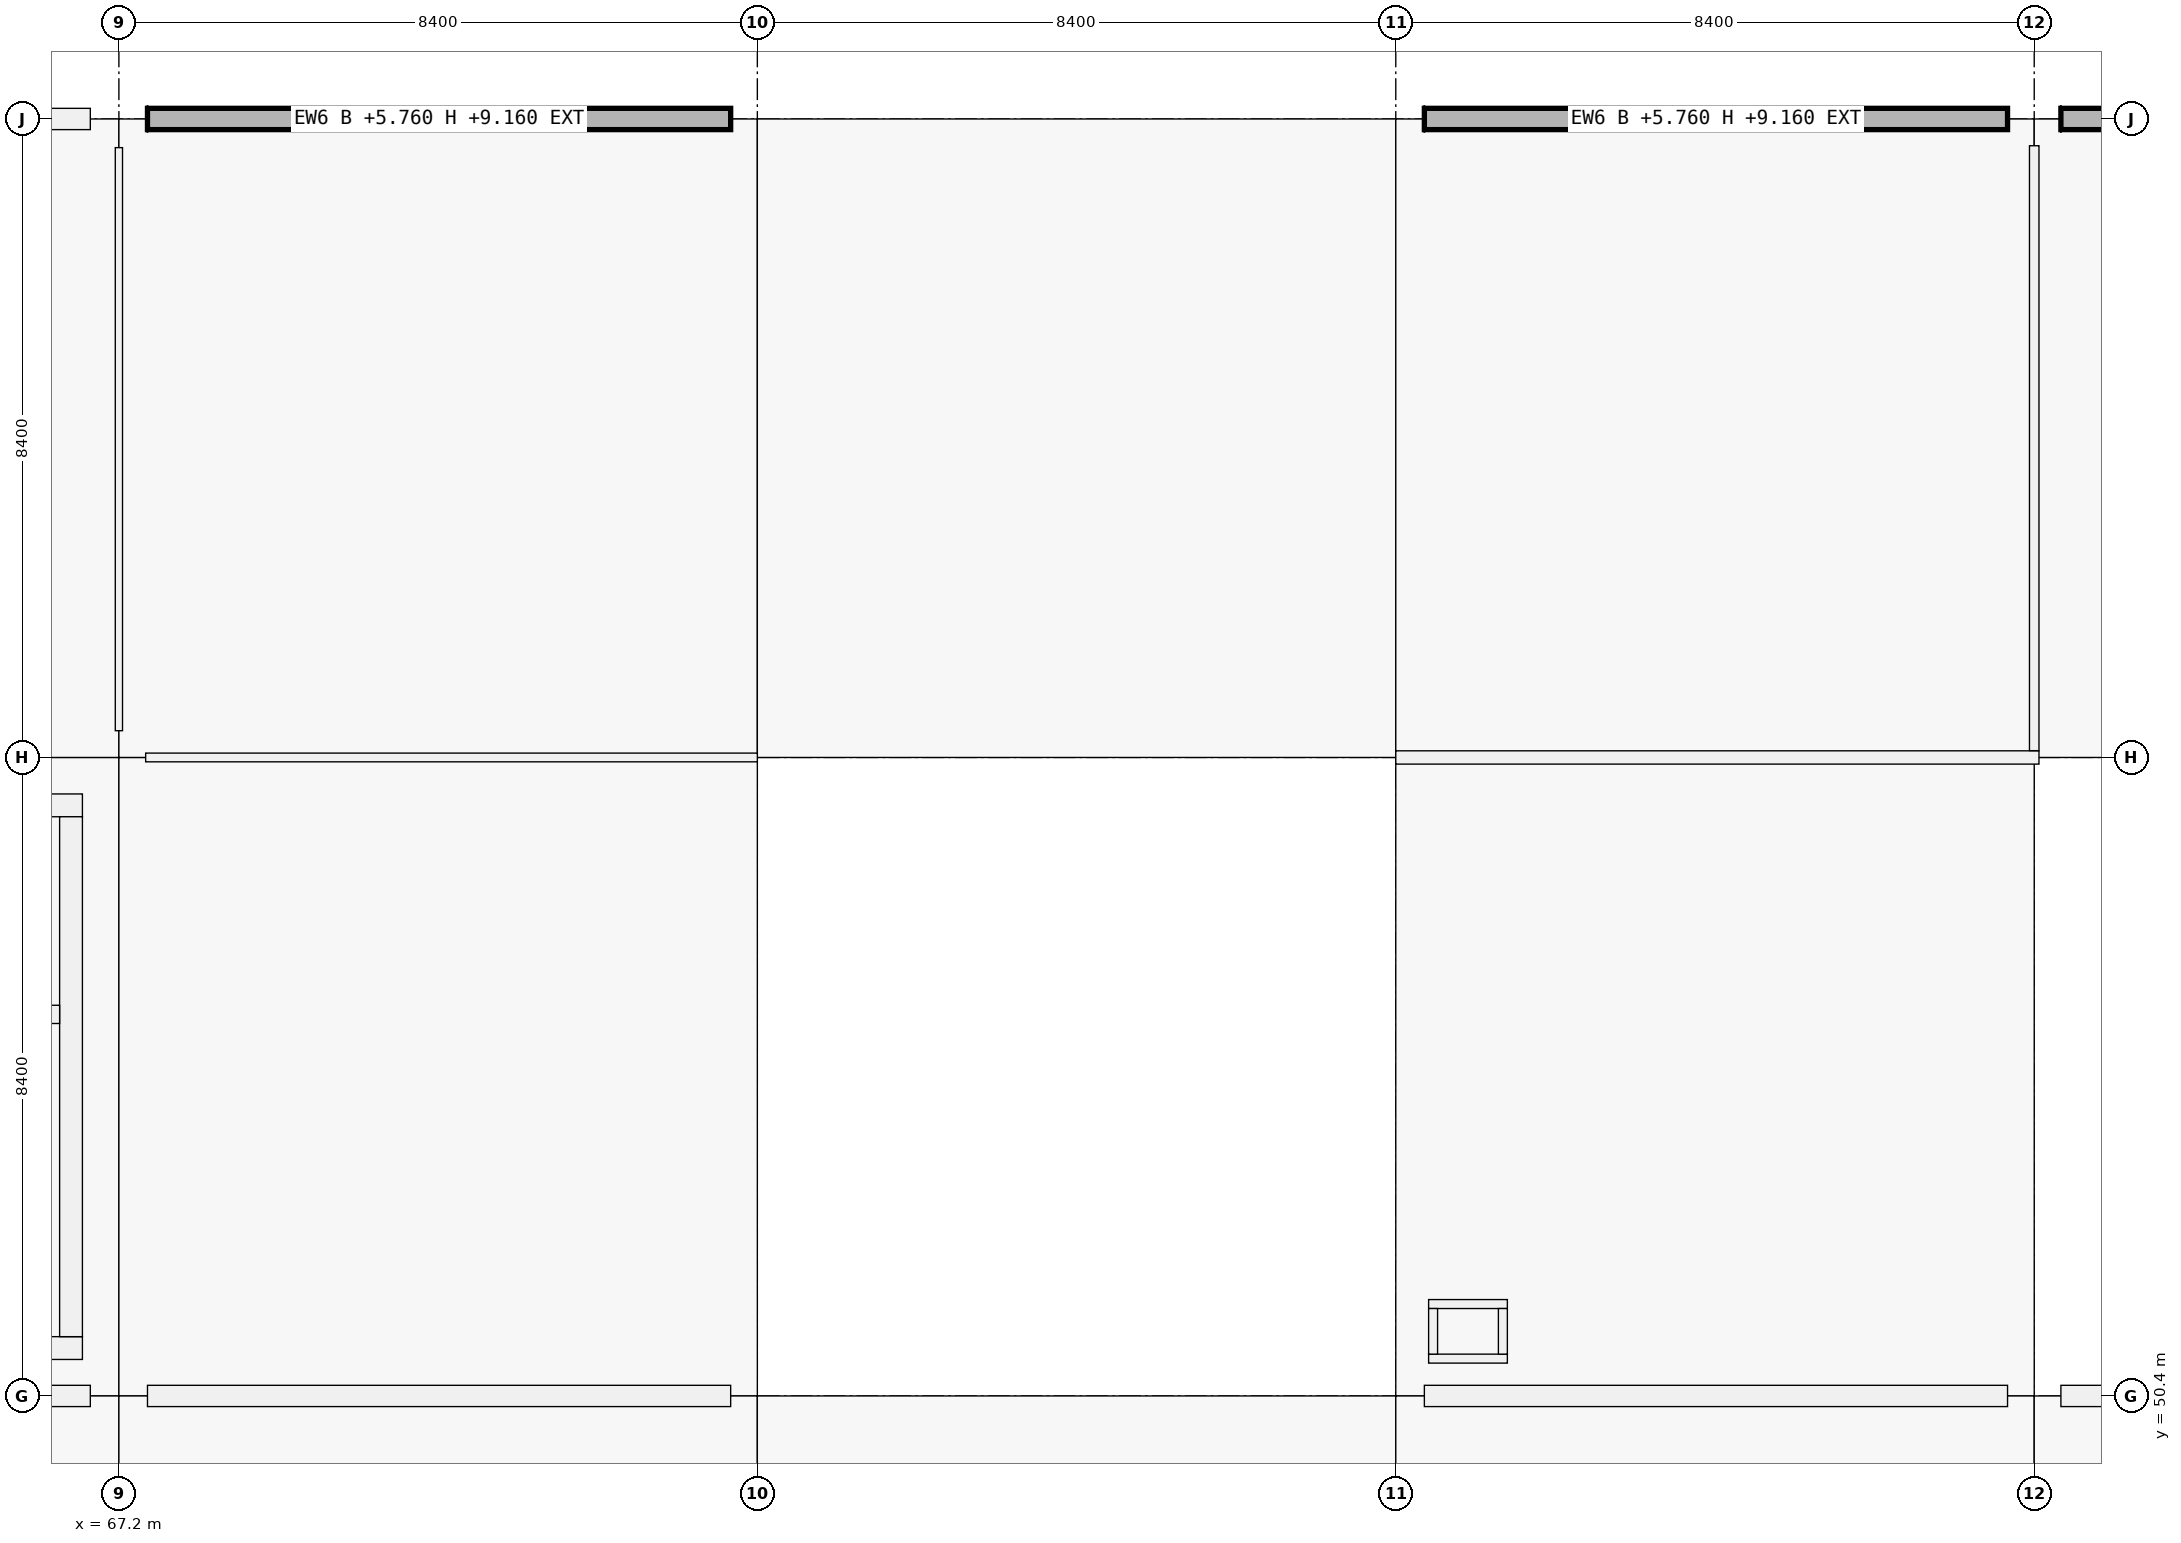
"""IFC4 building model, lengths in metres.
Left out: names, types, materials, properties, quantities, classifications, styles, units other than length and angle.
Written with IfcOpenShell. Run it as: python <this file> out.ifc"""

import sys

from ifc_helpers import new_model, si_unit, direction, frame, frame_2d, origin, origin_2d, place, context, subcontext, project, spatial, rectangle, extrude, element, fill, save


model = new_model("IFC4")
c1 = context("Model", 3, precision=1e-05, world=origin(), true_north=direction((0.0, 1.0)))
c2 = subcontext(c1, "Body", "Model", "MODEL_VIEW")
j1 = project(units=[si_unit("LENGTHUNIT", "METRE"), si_unit("PLANEANGLEUNIT", "RADIAN")], contexts=[c1])
p1 = place(None, origin())
s1 = spatial("IfcSite", under=j1, at=p1, CompositionType="ELEMENT")
p2 = place(p1, origin())
s2 = spatial("IfcBuilding", under=s1, at=p2, CompositionType="ELEMENT")
p3 = place(p2, frame((0.0, 0.0, 5.76)))
s3 = spatial("IfcBuildingStorey", under=s2, at=p3, CompositionType="ELEMENT", Elevation=5.76)
p4 = place(p3, frame((67.2, 50.4, 0.0), z_axis=(0.0, 0.0, 1.0), x_axis=(1.0, 0.0, 0.0)))
e1 = element("IfcColumn", 1, at=p4, inside=s3, PredefinedType="COLUMN", context=c2, shape_type="SweptSolid", body=[
    extrude(rectangle(XDim=0.75, YDim=0.75, at=origin_2d()), origin(), (0.0, 0.0, 1.0), 4.5),
])
p5 = place(p3, frame((67.2, 58.8, 0.0), z_axis=(0.0, 0.0, 1.0), x_axis=(1.0, 0.0, 0.0)))
e2 = element("IfcColumn", 2, at=p5, inside=s3, PredefinedType="COLUMN", context=c2, shape_type="SweptSolid", body=[
    extrude(rectangle(XDim=0.7, YDim=0.7, at=origin_2d()), origin(), (0.0, 0.0, 1.0), 4.5),
])
p6 = place(p3, frame((67.2, 67.2, 0.0), z_axis=(0.0, 0.0, 1.0), x_axis=(1.0, 0.0, 0.0)))
e3 = element("IfcColumn", 3, at=p6, inside=s3, PredefinedType="COLUMN", context=c2, shape_type="SweptSolid", body=[
    extrude(rectangle(XDim=0.75, YDim=0.75, at=origin_2d()), origin(), (0.0, 0.0, 1.0), 4.5),
])
for number, where, z_axis, x_axis in (
    (4, (75.6, 50.4, 0.0), (0.0, 0.0, 1.0), (1.0, 0.0, 0.0)),
    (5, (75.6, 67.2, 0.0), (0.0, 0.0, 1.0), (1.0, 0.0, 0.0)),
):
    element("IfcColumn", number, at=place(p3, frame(where, z_axis=z_axis, x_axis=x_axis)), inside=s3, PredefinedType="COLUMN", context=c2, shape_type="SweptSolid", body=[
        extrude(rectangle(XDim=0.7, YDim=0.7, at=origin_2d()), origin(), (0.0, 0.0, 1.0), 4.5),
    ])
for number, where, z_axis, x_axis in (
    (6, (84.0, 50.4, 0.0), (0.0, 0.0, 1.0), (1.0, 0.0, 0.0)),
    (7, (84.0, 67.2, 0.0), (0.0, 0.0, 1.0), (1.0, 0.0, 0.0)),
):
    element("IfcColumn", number, at=place(p3, frame(where, z_axis=z_axis, x_axis=x_axis)), inside=s3, PredefinedType="COLUMN", context=c2, shape_type="SweptSolid", body=[
        extrude(rectangle(XDim=0.75, YDim=0.75, at=origin_2d()), origin(), (0.0, 0.0, 1.0), 4.5),
    ])
for number, where, z_axis, x_axis in (
    (8, (92.4, 50.4, 0.0), (0.0, 0.0, 1.0), (1.0, 0.0, 0.0)),
    (9, (92.4, 67.2, 0.0), (0.0, 0.0, 1.0), (1.0, 0.0, 0.0)),
):
    element("IfcColumn", number, at=place(p3, frame(where, z_axis=z_axis, x_axis=x_axis)), inside=s3, PredefinedType="COLUMN", context=c2, shape_type="SweptSolid", body=[
        extrude(rectangle(XDim=0.7, YDim=0.7, at=origin_2d()), origin(), (0.0, 0.0, 1.0), 4.5),
    ])
p7 = place(p3, frame((66.824, 50.4, 0.0), z_axis=(0.0, 0.0, 1.0), x_axis=(-1.0, 0.0, 0.0)))
e10 = element("IfcWall", 10, at=p7, inside=s3, PredefinedType="SOLIDWALL", context=c2, shape_type="SweptSolid", body=[
    extrude(rectangle(XDim=7.673, YDim=0.28, at=frame_2d((3.836, 0.0))), origin(), (0.0, 0.0, 1.0), 3.4),
])
p8 = place(p3, frame((59.201, 67.2, 0.0), z_axis=(0.0, 0.0, 1.0), x_axis=(1.0, 0.0, 0.0)))
e11 = element("IfcWall", 11, at=p8, inside=s3, PredefinedType="SOLIDWALL", context=c2, shape_type="SweptSolid", body=[
    extrude(rectangle(XDim=7.623, YDim=0.28, at=frame_2d((3.812, 0.0))), origin(), (0.0, 0.0, 1.0), 3.4),
])
p9 = place(p8, frame((2.787, 0.0, 0.9)))
e12 = element("IfcOpeningElement", 12, at=p9, cuts=e11, PredefinedType="OPENING", context=c2, shape_type="SweptSolid", body=[
    extrude(rectangle(XDim=2.05, YDim=1.45, at=frame_2d((1.025, 0.725))), frame((0.0, 0.14, 0.0), z_axis=(0.0, -1.0, 0.0), x_axis=(1.0, 0.0, 0.0)), (0.0, 0.0, 1.0), 0.28),
])
p10 = place(p3, frame((75.249, 50.4, 0.0), z_axis=(0.0, 0.0, 1.0), x_axis=(-1.0, 0.0, 0.0)))
e13 = element("IfcWall", 13, at=p10, inside=s3, PredefinedType="SOLIDWALL", context=c2, shape_type="SweptSolid", body=[
    extrude(rectangle(XDim=7.673, YDim=0.28, at=frame_2d((3.836, 0.0))), origin(), (0.0, 0.0, 1.0), 3.4),
])
p11 = place(p10, frame((2.937, 0.0, 0.9)))
e14 = element("IfcOpeningElement", 14, at=p11, cuts=e13, PredefinedType="OPENING", context=c2, shape_type="SweptSolid", body=[
    extrude(rectangle(XDim=1.8, YDim=1.8, at=frame_2d((0.9, 0.9))), frame((0.0, 0.14, 0.0), z_axis=(0.0, -1.0, 0.0), x_axis=(1.0, 0.0, 0.0)), (0.0, 0.0, 1.0), 0.28),
])
p12 = place(p3, frame((67.576, 67.2, 0.0), z_axis=(0.0, 0.0, 1.0), x_axis=(1.0, 0.0, 0.0)))
e15 = element("IfcWall", 15, at=p12, inside=s3, PredefinedType="SOLIDWALL", context=c2, shape_type="SweptSolid", body=[
    extrude(rectangle(XDim=7.673, YDim=0.28, at=frame_2d((3.836, 0.0))), origin(), (0.0, 0.0, 1.0), 3.4),
])
p13 = place(p12, frame((2.787, 0.0, 0.9)))
e16 = element("IfcOpeningElement", 16, at=p13, cuts=e15, PredefinedType="OPENING", context=c2, shape_type="SweptSolid", body=[
    extrude(rectangle(XDim=2.1, YDim=1.8, at=frame_2d((1.05, 0.9))), frame((0.0, 0.14, 0.0), z_axis=(0.0, -1.0, 0.0), x_axis=(1.0, 0.0, 0.0)), (0.0, 0.0, 1.0), 0.28),
])
p14 = place(p3, frame((92.049, 50.4, 0.0), z_axis=(0.0, 0.0, 1.0), x_axis=(-1.0, 0.0, 0.0)))
e17 = element("IfcWall", 17, at=p14, inside=s3, PredefinedType="SOLIDWALL", context=c2, shape_type="SweptSolid", body=[
    extrude(rectangle(XDim=7.673, YDim=0.28, at=frame_2d((3.836, 0.0))), origin(), (0.0, 0.0, 1.0), 3.4),
])
p15 = place(p14, frame((2.537, 0.0, 0.9)))
e18 = element("IfcOpeningElement", 18, at=p15, cuts=e17, PredefinedType="OPENING", context=c2, shape_type="SweptSolid", body=[
    extrude(rectangle(XDim=2.6, YDim=2.1, at=frame_2d((1.3, 1.05))), frame((0.0, 0.14, 0.0), z_axis=(0.0, -1.0, 0.0), x_axis=(1.0, 0.0, 0.0)), (0.0, 0.0, 1.0), 0.28),
])
p16 = place(p3, frame((84.376, 67.2, 0.0), z_axis=(0.0, 0.0, 1.0), x_axis=(1.0, 0.0, 0.0)))
e19 = element("IfcWall", 19, at=p16, inside=s3, PredefinedType="SOLIDWALL", context=c2, shape_type="SweptSolid", body=[
    extrude(rectangle(XDim=7.673, YDim=0.28, at=frame_2d((3.836, 0.0))), origin(), (0.0, 0.0, 1.0), 3.4),
])
p17 = place(p16, frame((3.236, 0.0, 0.9)))
e20 = element("IfcOpeningElement", 20, at=p17, cuts=e19, PredefinedType="OPENING", context=c2, shape_type="SweptSolid", body=[
    extrude(rectangle(XDim=1.2, YDim=2.1, at=frame_2d((0.6, 1.05))), frame((0.0, 0.14, 0.0), z_axis=(0.0, -1.0, 0.0), x_axis=(1.0, 0.0, 0.0)), (0.0, 0.0, 1.0), 0.28),
])
p18 = place(p3, frame((100.424, 50.4, 0.0), z_axis=(0.0, 0.0, 1.0), x_axis=(-1.0, 0.0, 0.0)))
e21 = element("IfcWall", 21, at=p18, inside=s3, PredefinedType="SOLIDWALL", context=c2, shape_type="SweptSolid", body=[
    extrude(rectangle(XDim=7.673, YDim=0.28, at=frame_2d((3.836, 0.0))), origin(), (0.0, 0.0, 1.0), 3.4),
])
p19 = place(p18, frame((2.736, 0.0, 0.9)))
e22 = element("IfcOpeningElement", 22, at=p19, cuts=e21, PredefinedType="OPENING", context=c2, shape_type="SweptSolid", body=[
    extrude(rectangle(XDim=2.2, YDim=1.75, at=frame_2d((1.1, 0.875))), frame((0.0, 0.14, 0.0), z_axis=(0.0, -1.0, 0.0), x_axis=(1.0, 0.0, 0.0)), (0.0, 0.0, 1.0), 0.28),
])
p20 = place(p3, frame((92.751, 67.2, 0.0), z_axis=(0.0, 0.0, 1.0), x_axis=(1.0, 0.0, 0.0)))
e23 = element("IfcWall", 23, at=p20, inside=s3, PredefinedType="SOLIDWALL", context=c2, shape_type="SweptSolid", body=[
    extrude(rectangle(XDim=7.673, YDim=0.28, at=frame_2d((3.836, 0.0))), origin(), (0.0, 0.0, 1.0), 3.4),
])
p21 = place(p20, frame((2.437, 0.0, 0.9)))
e24 = element("IfcOpeningElement", 24, at=p21, cuts=e23, PredefinedType="OPENING", context=c2, shape_type="SweptSolid", body=[
    extrude(rectangle(XDim=2.8, YDim=1.75, at=frame_2d((1.4, 0.875))), frame((0.0, 0.14, 0.0), z_axis=(0.0, -1.0, 0.0), x_axis=(1.0, 0.0, 0.0)), (0.0, 0.0, 1.0), 0.28),
])
for number, where, z_axis, x_axis in (
    (25, (66.72, 51.03, 0.0), (0.0, 0.0, 1.0), (-1.0, 0.0, 0.0)),
    (26, (59.28, 58.17, 0.0), (0.0, 0.0, 1.0), (1.0, 0.0, 0.0)),
):
    element("IfcWall", number, at=place(p3, frame(where, z_axis=z_axis, x_axis=x_axis)), inside=s3, PredefinedType="SHEAR", context=c2, shape_type="SweptSolid", body=[
        extrude(rectangle(XDim=7.44, YDim=0.3, at=frame_2d((3.72, 0.0))), origin(), (0.0, 0.0, 1.0), 4.5),
    ])
p22 = place(p3, frame((66.57, 58.02, 0.0), z_axis=(0.0, 0.0, 1.0), x_axis=(0.0, -1.0, 0.0)))
e27 = element("IfcWall", 27, at=p22, inside=s3, PredefinedType="SHEAR", context=c2, shape_type="SweptSolid", body=[
    extrude(rectangle(XDim=6.84, YDim=0.3, at=frame_2d((3.42, 0.0))), origin(), (0.0, 0.0, 1.0), 4.5),
])
p23 = place(p22, frame((3.97, 0.0, 0.0)))
e28 = element("IfcOpeningElement", 28, at=p23, cuts=e27, PredefinedType="OPENING", context=c2, shape_type="SweptSolid", body=[
    extrude(rectangle(XDim=1.5, YDim=2.15, at=frame_2d((0.75, 1.075))), frame((0.0, 0.15, 0.0), z_axis=(0.0, -1.0, 0.0), x_axis=(1.0, 0.0, 0.0)), (0.0, 0.0, 1.0), 0.3),
])
p24 = place(p3, frame((62.96, 55.42, 0.0), z_axis=(0.0, 0.0, 1.0), x_axis=(1.0, 0.0, 0.0)))
e29 = element("IfcWall", 29, at=p24, inside=s3, PredefinedType="SHEAR", context=c2, shape_type="SweptSolid", body=[
    extrude(rectangle(XDim=3.46, YDim=0.24, at=frame_2d((1.73, 0.0))), origin(), (0.0, 0.0, 1.0), 4.5),
])
p25 = place(p24, frame((1.18, 0.0, 0.0)))
e30 = element("IfcOpeningElement", 30, at=p25, cuts=e29, PredefinedType="OPENING", context=c2, shape_type="SweptSolid", body=[
    extrude(rectangle(XDim=1.1, YDim=2.15, at=frame_2d((0.55, 1.075))), frame((0.0, 0.12, 0.0), z_axis=(0.0, -1.0, 0.0), x_axis=(1.0, 0.0, 0.0)), (0.0, 0.0, 1.0), 0.24),
])
for number, where, z_axis, x_axis in (
    (31, (84.432, 50.891, 0.0), (0.0, 0.0, 1.0), (1.0, 0.0, 0.0)),
    (32, (84.432, 51.609, 0.0), (0.0, 0.0, 1.0), (1.0, 0.0, 0.0)),
):
    element("IfcWall", number, at=place(p3, frame(where, z_axis=z_axis, x_axis=x_axis)), inside=s3, PredefinedType="PARTITIONING", context=c2, shape_type="SweptSolid", body=[
        extrude(rectangle(XDim=1.036, YDim=0.118, at=frame_2d((0.518, 0.0))), origin(), (0.0, 0.0, 1.0), 3.48),
    ])
p26 = place(p3, frame((84.491, 50.95, 0.0), z_axis=(0.0, 0.0, 1.0), x_axis=(0.0, 1.0, 0.0)))
e33 = element("IfcWall", 33, at=p26, inside=s3, PredefinedType="PARTITIONING", context=c2, shape_type="SweptSolid", body=[
    extrude(rectangle(XDim=0.6, YDim=0.118, at=frame_2d((0.3, 0.0))), origin(), (0.0, 0.0, 1.0), 2.4),
])
p27 = place(p3, frame((85.409, 50.95, 0.0), z_axis=(0.0, 0.0, 1.0), x_axis=(0.0, 1.0, 0.0)))
e34 = element("IfcWall", 34, at=p27, inside=s3, PredefinedType="PARTITIONING", context=c2, shape_type="SweptSolid", body=[
    extrude(rectangle(XDim=0.6, YDim=0.118, at=frame_2d((0.3, 0.0))), origin(), (0.0, 0.0, 1.0), 3.48),
])
p28 = place(p3, frame((67.552, 58.8, 0.0), z_axis=(0.0, 0.0, 1.0), x_axis=(1.0, 0.0, 0.0)))
e35 = element("IfcWall", 35, at=p28, inside=s3, PredefinedType="PARTITIONING", context=c2, shape_type="SweptSolid", body=[
    extrude(rectangle(XDim=8.048, YDim=0.115, at=frame_2d((4.024, 0.0))), origin(), (0.0, 0.0, 1.0), 2.4),
])
p29 = place(p28, frame((3.324, 0.0, 0.0)))
e36 = element("IfcOpeningElement", 36, at=p29, cuts=e35, PredefinedType="OPENING", context=c2, shape_type="SweptSolid", body=[
    extrude(rectangle(XDim=1.4, YDim=2.22, at=frame_2d((0.7, 1.11))), frame((0.0, 0.058, 0.0), z_axis=(0.0, -1.0, 0.0), x_axis=(1.0, 0.0, 0.0)), (0.0, 0.0, 1.0), 0.115),
])
p30 = place(p3, frame((84.0, 58.8, 0.0), z_axis=(0.0, 0.0, 1.0), x_axis=(1.0, 0.0, 0.0)))
e37 = element("IfcWall", 37, at=p30, inside=s3, PredefinedType="PARTITIONING", context=c2, shape_type="SweptSolid", body=[
    extrude(rectangle(XDim=8.462, YDim=0.175, at=frame_2d((4.231, 0.0))), origin(), (0.0, 0.0, 1.0), 2.4),
])
p31 = place(p30, frame((3.556, 0.0, 0.0)))
e38 = element("IfcOpeningElement", 38, at=p31, cuts=e37, PredefinedType="OPENING", context=c2, shape_type="SweptSolid", body=[
    extrude(rectangle(XDim=1.35, YDim=2.2, at=frame_2d((0.675, 1.1))), frame((0.0, 0.087, 0.0), z_axis=(0.0, -1.0, 0.0), x_axis=(1.0, 0.0, 0.0)), (0.0, 0.0, 1.0), 0.175),
])
p32 = place(p3, frame((67.2, 59.152, 0.0), z_axis=(0.0, 0.0, 1.0), x_axis=(0.0, 1.0, 0.0)))
e39 = element("IfcWall", 39, at=p32, inside=s3, PredefinedType="PARTITIONING", context=c2, shape_type="SweptSolid", body=[
    extrude(rectangle(XDim=7.671, YDim=0.095, at=frame_2d((3.835, 0.0))), origin(), (0.0, 0.0, 1.0), 2.4),
])
p33 = place(p32, frame((3.086, 0.0, 0.0)))
e40 = element("IfcOpeningElement", 40, at=p33, cuts=e39, PredefinedType="OPENING", context=c2, shape_type="SweptSolid", body=[
    extrude(rectangle(XDim=1.5, YDim=2.22, at=frame_2d((0.75, 1.11))), frame((0.0, 0.047, 0.0), z_axis=(0.0, -1.0, 0.0), x_axis=(1.0, 0.0, 0.0)), (0.0, 0.0, 1.0), 0.095),
])
p34 = place(p3, frame((92.4, 58.889, 0.0), z_axis=(0.0, 0.0, 1.0), x_axis=(0.0, 1.0, 0.0)))
e41 = element("IfcWall", 41, at=p34, inside=s3, PredefinedType="PARTITIONING", context=c2, shape_type="SweptSolid", body=[
    extrude(rectangle(XDim=7.958, YDim=0.125, at=frame_2d((3.979, 0.0))), origin(), (0.0, 0.0, 1.0), 2.4),
])
p35 = place(p34, frame((3.279, 0.0, 0.0)))
e42 = element("IfcOpeningElement", 42, at=p35, cuts=e41, PredefinedType="OPENING", context=c2, shape_type="SweptSolid", body=[
    extrude(rectangle(XDim=1.4, YDim=2.22, at=frame_2d((0.7, 1.11))), frame((0.0, 0.062, 0.0), z_axis=(0.0, -1.0, 0.0), x_axis=(1.0, 0.0, 0.0)), (0.0, 0.0, 1.0), 0.125),
])
p36 = place(p11, origin())
e43 = element("IfcWindow", 43, at=p36, inside=s3, PartitioningType="SINGLE_PANEL", PredefinedType="WINDOW", context=c2, shape_type="SweptSolid", body=[
    extrude(rectangle(XDim=1.8, YDim=1.8, at=frame_2d((0.9, 0.9))), frame((0.0, 0.03, 0.0), z_axis=(0.0, -1.0, 0.0), x_axis=(1.0, 0.0, 0.0)), (0.0, 0.0, 1.0), 0.06),
])
fill(e14, e43)
p37 = place(p13, origin())
e44 = element("IfcWindow", 44, at=p37, inside=s3, PartitioningType="SINGLE_PANEL", PredefinedType="WINDOW", context=c2, shape_type="SweptSolid", body=[
    extrude(rectangle(XDim=2.1, YDim=1.8, at=frame_2d((1.05, 0.9))), frame((0.0, 0.03, 0.0), z_axis=(0.0, -1.0, 0.0), x_axis=(1.0, 0.0, 0.0)), (0.0, 0.0, 1.0), 0.06),
])
fill(e16, e44)
p38 = place(p15, origin())
e45 = element("IfcWindow", 45, at=p38, inside=s3, PartitioningType="SINGLE_PANEL", PredefinedType="WINDOW", context=c2, shape_type="SweptSolid", body=[
    extrude(rectangle(XDim=2.6, YDim=2.1, at=frame_2d((1.3, 1.05))), frame((0.0, 0.03, 0.0), z_axis=(0.0, -1.0, 0.0), x_axis=(1.0, 0.0, 0.0)), (0.0, 0.0, 1.0), 0.06),
])
fill(e18, e45)
p39 = place(p17, origin())
e46 = element("IfcWindow", 46, at=p39, inside=s3, PartitioningType="SINGLE_PANEL", PredefinedType="WINDOW", context=c2, shape_type="SweptSolid", body=[
    extrude(rectangle(XDim=1.2, YDim=2.1, at=frame_2d((0.6, 1.05))), frame((0.0, 0.03, 0.0), z_axis=(0.0, -1.0, 0.0), x_axis=(1.0, 0.0, 0.0)), (0.0, 0.0, 1.0), 0.06),
])
fill(e20, e46)
p40 = place(p23, origin())
e47 = element("IfcDoor", 47, at=p40, inside=s3, OperationType="DOUBLE_DOOR_SINGLE_SWING", PredefinedType="DOOR", context=c2, shape_type="SweptSolid", body=[
    extrude(rectangle(XDim=1.5, YDim=2.15, at=frame_2d((0.75, 1.075))), frame((0.0, 0.025, 0.0), z_axis=(0.0, -1.0, 0.0), x_axis=(1.0, 0.0, 0.0)), (0.0, 0.0, 1.0), 0.05),
])
fill(e28, e47)
p41 = place(p29, origin())
e48 = element("IfcDoor", 48, at=p41, inside=s3, OperationType="DOUBLE_DOOR_SINGLE_SWING", PredefinedType="DOOR", context=c2, shape_type="SweptSolid", body=[
    extrude(rectangle(XDim=1.4, YDim=2.22, at=frame_2d((0.7, 1.11))), frame((0.0, 0.025, 0.0), z_axis=(0.0, -1.0, 0.0), x_axis=(1.0, 0.0, 0.0)), (0.0, 0.0, 1.0), 0.05),
])
fill(e36, e48)
p42 = place(p31, origin())
e49 = element("IfcDoor", 49, at=p42, inside=s3, OperationType="DOUBLE_DOOR_SINGLE_SWING", PredefinedType="DOOR", context=c2, shape_type="SweptSolid", body=[
    extrude(rectangle(XDim=1.35, YDim=2.2, at=frame_2d((0.675, 1.1))), frame((0.0, 0.025, 0.0), z_axis=(0.0, -1.0, 0.0), x_axis=(1.0, 0.0, 0.0)), (0.0, 0.0, 1.0), 0.05),
])
fill(e38, e49)
p43 = place(p33, origin())
e50 = element("IfcDoor", 50, at=p43, inside=s3, OperationType="DOUBLE_DOOR_SINGLE_SWING", PredefinedType="DOOR", context=c2, shape_type="SweptSolid", body=[
    extrude(rectangle(XDim=1.5, YDim=2.22, at=frame_2d((0.75, 1.11))), frame((0.0, 0.025, 0.0), z_axis=(0.0, -1.0, 0.0), x_axis=(1.0, 0.0, 0.0)), (0.0, 0.0, 1.0), 0.05),
])
fill(e40, e50)
p44 = place(p35, origin())
e51 = element("IfcDoor", 51, at=p44, inside=s3, OperationType="DOUBLE_DOOR_SINGLE_SWING", PredefinedType="DOOR", context=c2, shape_type="SweptSolid", body=[
    extrude(rectangle(XDim=1.4, YDim=2.22, at=frame_2d((0.7, 1.11))), frame((0.0, 0.025, 0.0), z_axis=(0.0, -1.0, 0.0), x_axis=(1.0, 0.0, 0.0)), (0.0, 0.0, 1.0), 0.05),
])
fill(e42, e51)
save(model, sys.argv[1])
